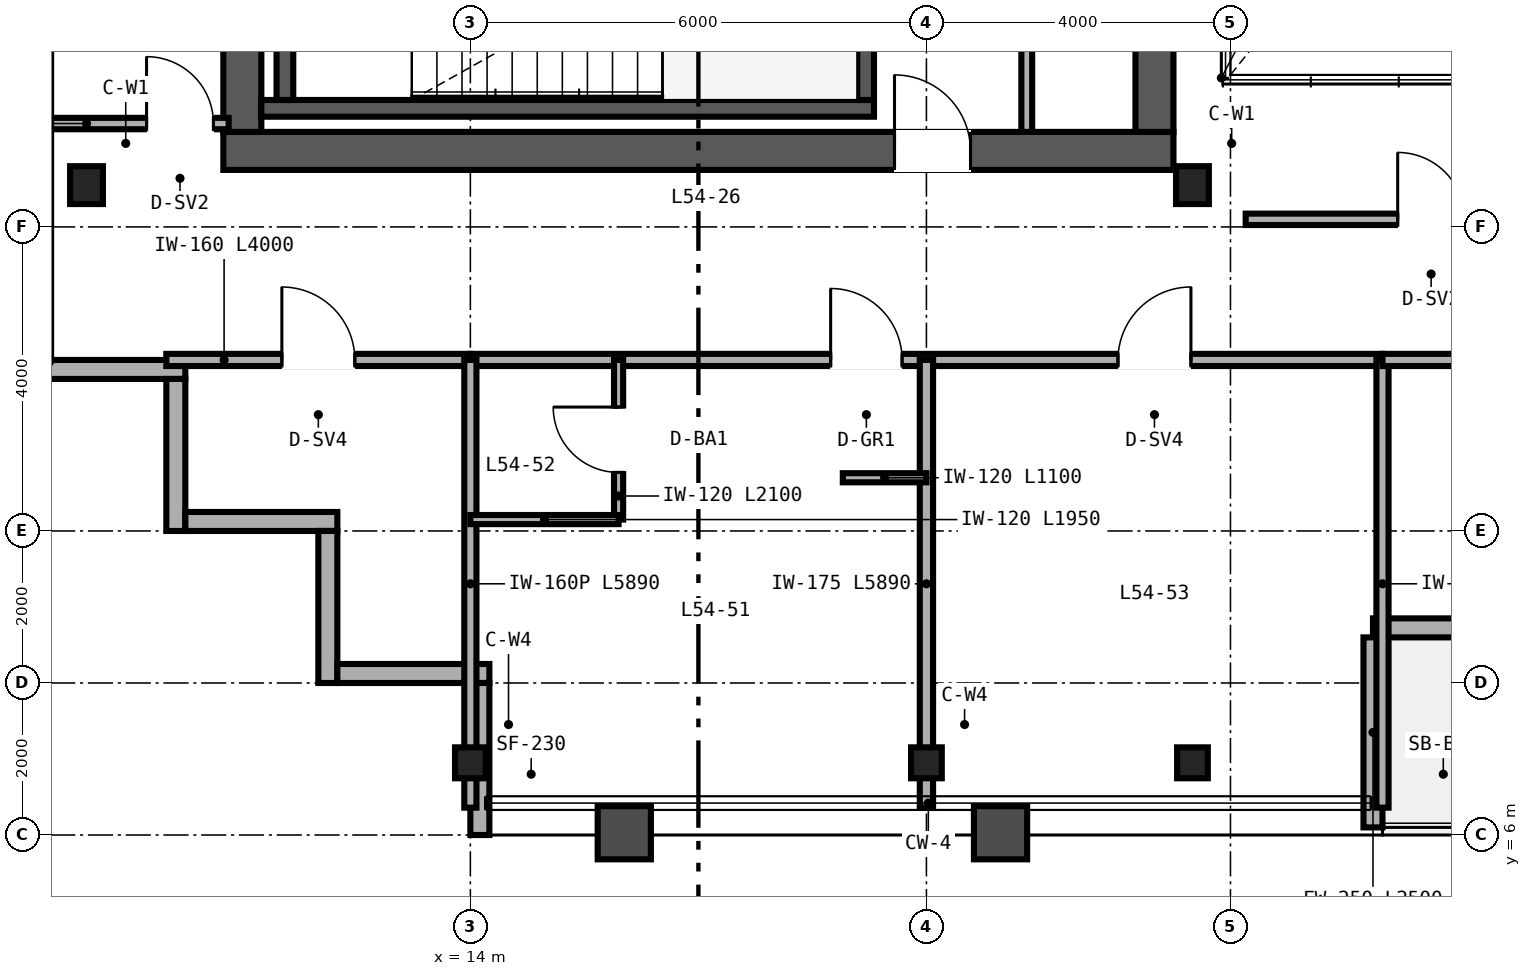
"""IFC4 building model, lengths in metres.
Left out: names, types, materials, properties, quantities, classifications, styles, units other than length and angle.
Written with IfcOpenShell. Run it as: python <this file> out.ifc"""

import sys

from ifc_helpers import new_model, si_unit, direction, frame, frame_2d, origin, origin_2d, place, context, subcontext, project, spatial, rectangle, i_section, extrude, source, transform, mapped, element, fill, save


model = new_model("IFC4")
c1 = context("Model", 3, precision=1e-05, world=origin(), true_north=direction((0.0, 1.0)))
c2 = subcontext(c1, "Body", "Model", "MODEL_VIEW")
j1 = project(units=[si_unit("LENGTHUNIT", "METRE"), si_unit("PLANEANGLEUNIT", "RADIAN")], contexts=[c1])
p1 = place(None, origin())
s1 = spatial("IfcSite", under=j1, at=p1, CompositionType="ELEMENT")
p2 = place(p1, origin())
s2 = spatial("IfcBuilding", under=s1, at=p2, CompositionType="ELEMENT")
p3 = place(p2, frame((0.0, 0.0, 213.6)))
s3 = spatial("IfcBuildingStorey", under=s2, at=p3, CompositionType="ELEMENT", Elevation=213.6)
p4 = place(p3, frame((10.75, 15.0, 0.0), z_axis=(0.0, 0.0, 1.0), x_axis=(1.0, 0.0, 0.0)))
e1 = element("IfcWall", 1, at=p4, inside=s3, PredefinedType="SHEAR", context=c2, shape_type="SweptSolid", body=[
    extrude(rectangle(XDim=12.5, YDim=0.5, at=frame_2d((6.25, 0.0))), origin(), (0.0, 0.0, 1.0), 3.37),
])
p5 = place(p4, frame((8.83, 0.0, 0.0)))
e2 = element("IfcOpeningElement", 2, at=p5, cuts=e1, PredefinedType="OPENING", context=c2, shape_type="SweptSolid", body=[
    extrude(rectangle(XDim=1.0, YDim=2.15, at=frame_2d((0.5, 1.075))), frame((0.0, 0.26, 0.0), z_axis=(0.0, -1.0, 0.0), x_axis=(1.0, 0.0, 0.0)), (0.0, 0.0, 1.0), 0.52),
])
for number, where, z_axis, x_axis in (
    (3, (11.0, 15.25, 0.0), (0.0, 0.0, 1.0), (0.0, 1.0, 0.0)),
    (4, (23.0, 15.25, 0.0), (0.0, 0.0, 1.0), (0.0, 1.0, 0.0)),
):
    element("IfcWall", number, at=place(p3, frame(where, z_axis=z_axis, x_axis=x_axis)), inside=s3, PredefinedType="SHEAR", context=c2, shape_type="SweptSolid", body=[
        extrude(rectangle(XDim=21.5, YDim=0.5, at=frame_2d((10.75, 0.0))), origin(), (0.0, 0.0, 1.0), 3.37),
    ])
p6 = place(p3, frame((11.25, 15.56, 0.0), z_axis=(0.0, 0.0, 1.0), x_axis=(1.0, 0.0, 0.0)))
e5 = element("IfcWall", 5, at=p6, inside=s3, PredefinedType="SHEAR", context=c2, shape_type="SweptSolid", body=[
    extrude(rectangle(XDim=8.06, YDim=0.22, at=frame_2d((4.03, 0.0))), origin(), (0.0, 0.0, 1.0), 3.4),
])
for number, where, z_axis, x_axis in (
    (6, (11.56, 15.67, 0.0), (0.0, 0.0, 1.0), (0.0, 1.0, 0.0)),
    (7, (19.2, 15.67, 0.0), (0.0, 0.0, 1.0), (0.0, 1.0, 0.0)),
):
    element("IfcWall", number, at=place(p3, frame(where, z_axis=z_axis, x_axis=x_axis)), inside=s3, PredefinedType="SHEAR", context=c2, shape_type="SweptSolid", body=[
        extrude(rectangle(XDim=3.28, YDim=0.22, at=frame_2d((1.64, 0.0))), origin(), (0.0, 0.0, 1.0), 3.4),
    ])
m1 = source(origin(), c2, "Body", "SweptSolid", [
    extrude(i_section(OverallWidth=0.432, OverallDepth=0.498, WebThickness=0.056, FlangeThickness=0.089, FilletRadius=0.025, at=origin_2d()), origin(), (0.0, 0.0, 1.0), 3.37),
])
for number, where, z_axis, x_axis in (
    (8, (8.95, 14.55, 0.0), (0.0, 0.0, 1.0), (1.0, 0.0, 0.0)),
    (9, (23.5, 14.55, 0.0), (0.0, 0.0, 1.0), (1.0, 0.0, 0.0)),
):
    element("IfcColumn", number, at=place(p3, frame(where, z_axis=z_axis, x_axis=x_axis)), inside=s3, PredefinedType="COLUMN", context=c2, shape_type="MappedRepresentation", body=[
        mapped(m1, transform((0.0, 0.0, 0.0), scale=1.0)),
    ])
m2 = source(origin(), c2, "Body", "SweptSolid", [
    extrude(i_section(OverallWidth=0.404, OverallDepth=0.407, WebThickness=0.027, FlangeThickness=0.044, FilletRadius=0.025, at=origin_2d()), origin(), (0.0, 0.0, 1.0), 3.37),
])
for number, where, z_axis, x_axis in (
    (10, (14.0, 6.95, 0.0), (0.0, 0.0, 1.0), (1.0, 0.0, 0.0)),
    (11, (20.0, 6.95, 0.0), (0.0, 0.0, 1.0), (1.0, 0.0, 0.0)),
    (12, (23.5, 6.95, 0.0), (0.0, 0.0, 1.0), (1.0, 0.0, 0.0)),
):
    element("IfcColumn", number, at=place(p3, frame(where, z_axis=z_axis, x_axis=x_axis)), inside=s3, PredefinedType="COLUMN", context=c2, shape_type="MappedRepresentation", body=[
        mapped(m2, transform((0.0, 0.0, 0.0), scale=1.0)),
    ])
p7 = place(p3, frame((8.0, 12.125, 0.0), z_axis=(0.0, 0.0, 1.0), x_axis=(1.0, 0.0, 0.0)))
e13 = element("IfcWall", 13, at=p7, inside=s3, PredefinedType="SOLIDWALL", context=c2, shape_type="SweptSolid", body=[
    extrude(rectangle(XDim=2.25, YDim=0.25, at=frame_2d((1.125, 0.0))), origin(), (0.0, 0.0, 1.0), 3.37),
])
for number, where, z_axis, x_axis in (
    (14, (10.125, 12.0, 0.0), (0.0, 0.0, 1.0), (0.0, -1.0, 0.0)),
    (15, (10.25, 10.125, 0.0), (0.0, 0.0, 1.0), (1.0, 0.0, 0.0)),
    (16, (12.125, 10.0, 0.0), (0.0, 0.0, 1.0), (0.0, -1.0, 0.0)),
    (17, (12.25, 8.125, 0.0), (0.0, 0.0, 1.0), (1.0, 0.0, 0.0)),
):
    element("IfcWall", number, at=place(p3, frame(where, z_axis=z_axis, x_axis=x_axis)), inside=s3, PredefinedType="SOLIDWALL", context=c2, shape_type="SweptSolid", body=[
        extrude(rectangle(XDim=2.0, YDim=0.25, at=frame_2d((1.0, 0.0))), origin(), (0.0, 0.0, 1.0), 3.37),
    ])
p8 = place(p3, frame((14.125, 8.0, 0.0), z_axis=(0.0, 0.0, 1.0), x_axis=(0.0, -1.0, 0.0)))
e18 = element("IfcWall", 18, at=p8, inside=s3, PredefinedType="SOLIDWALL", context=c2, shape_type="SweptSolid", body=[
    extrude(rectangle(XDim=2.0, YDim=0.25, at=frame_2d((1.0, 0.0))), origin(), (0.0, 0.0, 1.0), 2.677),
])
p9 = place(p3, frame((25.875, 8.725, 0.0), z_axis=(0.0, 0.0, 1.0), x_axis=(1.0, 0.0, 0.0)))
e19 = element("IfcWall", 19, at=p9, inside=s3, PredefinedType="SOLIDWALL", context=c2, shape_type="SweptSolid", body=[
    extrude(rectangle(XDim=12.25, YDim=0.25, at=frame_2d((6.125, 0.0))), origin(), (0.0, 0.0, 1.0), 3.37),
])
p10 = place(p9, frame((5.6, 0.0, 0.0)))
e20 = element("IfcOpeningElement", 20, at=p10, cuts=e19, PredefinedType="OPENING", context=c2, shape_type="SweptSolid", body=[
    extrude(rectangle(XDim=1.05, YDim=2.15, at=frame_2d((0.525, 1.075))), frame((0.0, 0.135, 0.0), z_axis=(0.0, -1.0, 0.0), x_axis=(1.0, 0.0, 0.0)), (0.0, 0.0, 1.0), 0.27),
])
p11 = place(p3, frame((25.875, 6.1, 0.0), z_axis=(0.0, 0.0, 1.0), x_axis=(0.0, 1.0, 0.0)))
e21 = element("IfcWall", 21, at=p11, inside=s3, PredefinedType="SOLIDWALL", context=c2, shape_type="SweptSolid", body=[
    extrude(rectangle(XDim=2.5, YDim=0.25, at=frame_2d((1.25, 0.0))), origin(), (0.0, 0.0, 1.0), 2.443),
])
p12 = place(p3, frame((21.32, 15.25, 0.0), z_axis=(0.0, 0.0, 1.0), x_axis=(0.0, 1.0, 0.0)))
e22 = element("IfcWall", 22, at=p12, inside=s3, PredefinedType="PARTITIONING", context=c2, shape_type="SweptSolid", body=[
    extrude(rectangle(XDim=3.59, YDim=0.142, at=frame_2d((1.795, 0.0))), origin(), (0.0, 0.0, 1.0), 3.37),
])
p13 = place(p12, frame((1.25, 0.0, 0.0)))
e23 = element("IfcOpeningElement", 23, at=p13, cuts=e22, PredefinedType="OPENING", context=c2, shape_type="SweptSolid", body=[
    extrude(rectangle(XDim=0.84, YDim=2.1, at=frame_2d((0.42, 1.05))), frame((0.0, 0.081, 0.0), z_axis=(0.0, -1.0, 0.0), x_axis=(1.0, 0.0, 0.0)), (0.0, 0.0, 1.0), 0.162),
])
p14 = place(p3, frame((24.2, 14.1, 0.0), z_axis=(0.0, 0.0, 1.0), x_axis=(1.0, 0.0, 0.0)))
e24 = element("IfcWall", 24, at=p14, inside=s3, PredefinedType="PARTITIONING", context=c2, shape_type="SweptSolid", body=[
    extrude(rectangle(XDim=15.6, YDim=0.15, at=frame_2d((7.8, 0.0))), origin(), (0.0, 0.0, 1.0), 3.37),
])
p15 = place(p14, frame((2.0, 0.0, 0.0)))
e25 = element("IfcOpeningElement", 25, at=p15, cuts=e24, PredefinedType="OPENING", context=c2, shape_type="SweptSolid", body=[
    extrude(rectangle(XDim=0.88, YDim=2.15, at=frame_2d((0.44, 1.075))), frame((0.0, 0.085, 0.0), z_axis=(0.0, -1.0, 0.0), x_axis=(1.0, 0.0, 0.0)), (0.0, 0.0, 1.0), 0.17),
])
p16 = place(p14, frame((7.25, 0.0, 0.0)))
e26 = element("IfcOpeningElement", 26, at=p16, cuts=e24, PredefinedType="OPENING", context=c2, shape_type="SweptSolid", body=[
    extrude(rectangle(XDim=0.88, YDim=2.15, at=frame_2d((0.44, 1.075))), frame((0.0, 0.085, 0.0), z_axis=(0.0, -1.0, 0.0), x_axis=(1.0, 0.0, 0.0)), (0.0, 0.0, 1.0), 0.17),
])
p17 = place(p14, frame((12.5, 0.0, 0.0)))
e27 = element("IfcOpeningElement", 27, at=p17, cuts=e24, PredefinedType="OPENING", context=c2, shape_type="SweptSolid", body=[
    extrude(rectangle(XDim=0.88, YDim=2.15, at=frame_2d((0.44, 1.075))), frame((0.0, 0.085, 0.0), z_axis=(0.0, -1.0, 0.0), x_axis=(1.0, 0.0, 0.0)), (0.0, 0.0, 1.0), 0.17),
])
p18 = place(p3, frame((8.16, 15.36, 0.0), z_axis=(0.0, 0.0, 1.0), x_axis=(1.0, 0.0, 0.0)))
e28 = element("IfcWall", 28, at=p18, inside=s3, PredefinedType="PARTITIONING", context=c2, shape_type="SweptSolid", body=[
    extrude(rectangle(XDim=2.66, YDim=0.15, at=frame_2d((1.33, 0.0))), origin(), (0.0, 0.0, 1.0), 2.591),
])
p19 = place(p18, frame((1.58, 0.0, 0.0)))
e29 = element("IfcOpeningElement", 29, at=p19, cuts=e28, PredefinedType="OPENING", context=c2, shape_type="SweptSolid", body=[
    extrude(rectangle(XDim=0.88, YDim=2.15, at=frame_2d((0.44, 1.075))), frame((0.0, 0.085, 0.0), z_axis=(0.0, -1.0, 0.0), x_axis=(1.0, 0.0, 0.0)), (0.0, 0.0, 1.0), 0.17),
])
p20 = place(p3, frame((10.0, 12.25, 0.0), z_axis=(0.0, 0.0, 1.0), x_axis=(1.0, 0.0, 0.0)))
e30 = element("IfcWall", 30, at=p20, inside=s3, PredefinedType="PARTITIONING", context=c2, shape_type="SweptSolid", body=[
    extrude(rectangle(XDim=4.0, YDim=0.16, at=frame_2d((2.0, 0.0))), origin(), (0.0, 0.0, 1.0), 3.37),
])
p21 = place(p20, frame((1.52, 0.0, 0.0)))
e31 = element("IfcOpeningElement", 31, at=p21, cuts=e30, PredefinedType="OPENING", context=c2, shape_type="SweptSolid", body=[
    extrude(rectangle(XDim=0.96, YDim=2.15, at=frame_2d((0.48, 1.075))), frame((0.0, 0.09, 0.0), z_axis=(0.0, -1.0, 0.0), x_axis=(1.0, 0.0, 0.0)), (0.0, 0.0, 1.0), 0.18),
])
p22 = place(p3, frame((14.0, 12.25, 0.0), z_axis=(0.0, 0.0, 1.0), x_axis=(1.0, 0.0, 0.0)))
e32 = element("IfcWall", 32, at=p22, inside=s3, PredefinedType="PARTITIONING", context=c2, shape_type="SweptSolid", body=[
    extrude(rectangle(XDim=12.0, YDim=0.16, at=frame_2d((6.0, 0.0))), origin(), (0.0, 0.0, 1.0), 2.913),
])
p23 = place(p22, frame((4.74, 0.0, 0.0)))
e33 = element("IfcOpeningElement", 33, at=p23, cuts=e32, PredefinedType="OPENING", context=c2, shape_type="SweptSolid", body=[
    extrude(rectangle(XDim=0.94, YDim=2.15, at=frame_2d((0.47, 1.075))), frame((0.0, 0.09, 0.0), z_axis=(0.0, -1.0, 0.0), x_axis=(1.0, 0.0, 0.0)), (0.0, 0.0, 1.0), 0.18),
])
p24 = place(p22, frame((8.52, 0.0, 0.0)))
e34 = element("IfcOpeningElement", 34, at=p24, cuts=e32, PredefinedType="OPENING", context=c2, shape_type="SweptSolid", body=[
    extrude(rectangle(XDim=0.96, YDim=2.15, at=frame_2d((0.48, 1.075))), frame((0.0, 0.09, 0.0), z_axis=(0.0, -1.0, 0.0), x_axis=(1.0, 0.0, 0.0)), (0.0, 0.0, 1.0), 0.18),
])
p25 = place(p3, frame((14.0, 6.36, 0.0), z_axis=(0.0, 0.0, 1.0), x_axis=(0.0, 1.0, 0.0)))
e35 = element("IfcWall", 35, at=p25, inside=s3, PredefinedType="PARTITIONING", context=c2, shape_type="SweptSolid", body=[
    extrude(rectangle(XDim=5.89, YDim=0.16, at=frame_2d((2.945, 0.0))), origin(), (0.0, 0.0, 1.0), 2.677),
])
p26 = place(p3, frame((26.0, 6.36, 0.0), z_axis=(0.0, 0.0, 1.0), x_axis=(0.0, 1.0, 0.0)))
e36 = element("IfcWall", 36, at=p26, inside=s3, PredefinedType="PARTITIONING", context=c2, shape_type="SweptSolid", body=[
    extrude(rectangle(XDim=5.89, YDim=0.16, at=frame_2d((2.945, 0.0))), origin(), (0.0, 0.0, 1.0), 2.443),
])
p27 = place(p3, frame((20.0, 6.36, 0.0), z_axis=(0.0, 0.0, 1.0), x_axis=(0.0, 1.0, 0.0)))
e37 = element("IfcWall", 37, at=p27, inside=s3, PredefinedType="PARTITIONING", context=c2, shape_type="SweptSolid", body=[
    extrude(rectangle(XDim=5.89, YDim=0.175, at=frame_2d((2.945, 0.0))), origin(), (0.0, 0.0, 1.0), 2.677),
])
p28 = place(p3, frame((15.95, 10.15, 0.0), z_axis=(0.0, 0.0, 1.0), x_axis=(0.0, 1.0, 0.0)))
e38 = element("IfcWall", 38, at=p28, inside=s3, PredefinedType="PARTITIONING", context=c2, shape_type="SweptSolid", body=[
    extrude(rectangle(XDim=2.1, YDim=0.12, at=frame_2d((1.05, 0.0))), origin(), (0.0, 0.0, 1.0), 3.37),
])
p29 = place(p28, frame((0.62, 0.0, 0.0)))
e39 = element("IfcOpeningElement", 39, at=p29, cuts=e38, PredefinedType="OPENING", context=c2, shape_type="SweptSolid", body=[
    extrude(rectangle(XDim=0.86, YDim=2.1, at=frame_2d((0.43, 1.05))), frame((0.0, 0.07, 0.0), z_axis=(0.0, -1.0, 0.0), x_axis=(1.0, 0.0, 0.0)), (0.0, 0.0, 1.0), 0.14),
])
p30 = place(p3, frame((14.0, 10.15, 0.0), z_axis=(0.0, 0.0, 1.0), x_axis=(1.0, 0.0, 0.0)))
e40 = element("IfcWall", 40, at=p30, inside=s3, PredefinedType="PARTITIONING", context=c2, shape_type="SweptSolid", body=[
    extrude(rectangle(XDim=1.95, YDim=0.12, at=frame_2d((0.975, 0.0))), origin(), (0.0, 0.0, 1.0), 3.37),
])
p31 = place(p3, frame((18.9, 10.7, 0.0), z_axis=(0.0, 0.0, 1.0), x_axis=(1.0, 0.0, 0.0)))
e41 = element("IfcWall", 41, at=p31, inside=s3, PredefinedType="PARTITIONING", context=c2, shape_type="SweptSolid", body=[
    extrude(rectangle(XDim=1.1, YDim=0.12, at=frame_2d((0.55, 0.0))), origin(), (0.0, 0.0, 1.0), 3.37),
])
p32 = place(p3, frame((26.0, 12.25, 0.0), z_axis=(0.0, 0.0, 1.0), x_axis=(1.0, 0.0, 0.0)))
e42 = element("IfcWall", 42, at=p32, inside=s3, PredefinedType="PARTITIONING", context=c2, shape_type="SweptSolid", body=[
    extrude(rectangle(XDim=12.0, YDim=0.16, at=frame_2d((6.0, 0.0))), origin(), (0.0, 0.0, 1.0), 3.37),
])
p33 = place(p32, frame((5.2, 0.0, 0.0)))
e43 = element("IfcOpeningElement", 43, at=p33, cuts=e42, PredefinedType="OPENING", context=c2, shape_type="SweptSolid", body=[
    extrude(rectangle(XDim=0.96, YDim=2.15, at=frame_2d((0.48, 1.075))), frame((0.0, 0.09, 0.0), z_axis=(0.0, -1.0, 0.0), x_axis=(1.0, 0.0, 0.0)), (0.0, 0.0, 1.0), 0.18),
])
m3 = source(origin(), c2, "Body", "SweptSolid", [
    extrude(rectangle(XDim=1.0, YDim=2.15, at=frame_2d((0.5, 1.075))), frame((0.0, 0.025, 0.0), z_axis=(0.0, -1.0, 0.0), x_axis=(1.0, 0.0, 0.0)), (0.0, 0.0, 1.0), 0.05),
])
p34 = place(p5, origin())
e44 = element("IfcDoor", 44, at=p34, inside=s3, OperationType="SINGLE_SWING_LEFT", PredefinedType="DOOR", context=c2, shape_type="MappedRepresentation", body=[
    mapped(m3, transform((0.0, 0.0, 0.0), scale=1.0)),
])
fill(e2, e44)
m4 = source(origin(), c2, "Body", "SweptSolid", [
    extrude(rectangle(XDim=0.88, YDim=2.15, at=frame_2d((0.44, 1.075))), frame((0.0, 0.025, 0.0), z_axis=(0.0, -1.0, 0.0), x_axis=(1.0, 0.0, 0.0)), (0.0, 0.0, 1.0), 0.05),
])
p35 = place(p15, origin())
e45 = element("IfcDoor", 45, at=p35, inside=s3, OperationType="SINGLE_SWING_LEFT", PredefinedType="DOOR", context=c2, shape_type="MappedRepresentation", body=[
    mapped(m4, transform((0.0, 0.0, 0.0), scale=1.0)),
])
fill(e25, e45)
p36 = place(p19, origin())
e46 = element("IfcDoor", 46, at=p36, inside=s3, OperationType="SINGLE_SWING_LEFT", PredefinedType="DOOR", context=c2, shape_type="MappedRepresentation", body=[
    mapped(m4, transform((0.0, 0.0, 0.0), scale=1.0)),
])
fill(e29, e46)
m5 = source(origin(), c2, "Body", "SweptSolid", [
    extrude(rectangle(XDim=0.96, YDim=2.15, at=frame_2d((0.48, 1.075))), frame((0.0, 0.025, 0.0), z_axis=(0.0, -1.0, 0.0), x_axis=(1.0, 0.0, 0.0)), (0.0, 0.0, 1.0), 0.05),
])
p37 = place(p21, origin())
e47 = element("IfcDoor", 47, at=p37, inside=s3, OperationType="SINGLE_SWING_LEFT", PredefinedType="DOOR", context=c2, shape_type="MappedRepresentation", body=[
    mapped(m5, transform((0.0, 0.0, 0.0), scale=1.0)),
])
fill(e31, e47)
m6 = source(origin(), c2, "Body", "SweptSolid", [
    extrude(rectangle(XDim=0.86, YDim=2.1, at=frame_2d((0.43, 1.05))), frame((0.0, 0.025, 0.0), z_axis=(0.0, -1.0, 0.0), x_axis=(1.0, 0.0, 0.0)), (0.0, 0.0, 1.0), 0.05),
])
p38 = place(p29, origin())
e48 = element("IfcDoor", 48, at=p38, inside=s3, OperationType="SINGLE_SWING_RIGHT", PredefinedType="DOOR", context=c2, shape_type="MappedRepresentation", body=[
    mapped(m6, transform((0.0, 0.0, 0.0), scale=1.0)),
])
fill(e39, e48)
m7 = source(origin(), c2, "Body", "SweptSolid", [
    extrude(rectangle(XDim=0.94, YDim=2.15, at=frame_2d((0.47, 1.075))), frame((0.0, 0.025, 0.0), z_axis=(0.0, -1.0, 0.0), x_axis=(1.0, 0.0, 0.0)), (0.0, 0.0, 1.0), 0.05),
])
p39 = place(p23, origin())
e49 = element("IfcDoor", 49, at=p39, inside=s3, OperationType="SINGLE_SWING_LEFT", PredefinedType="DOOR", context=c2, shape_type="MappedRepresentation", body=[
    mapped(m7, transform((0.0, 0.0, 0.0), scale=1.0)),
])
fill(e33, e49)
p40 = place(p24, origin())
e50 = element("IfcDoor", 50, at=p40, inside=s3, OperationType="SINGLE_SWING_RIGHT", PredefinedType="DOOR", context=c2, shape_type="MappedRepresentation", body=[
    mapped(m5, transform((0.0, 0.0, 0.0), scale=1.0)),
])
fill(e34, e50)
save(model, sys.argv[1])
